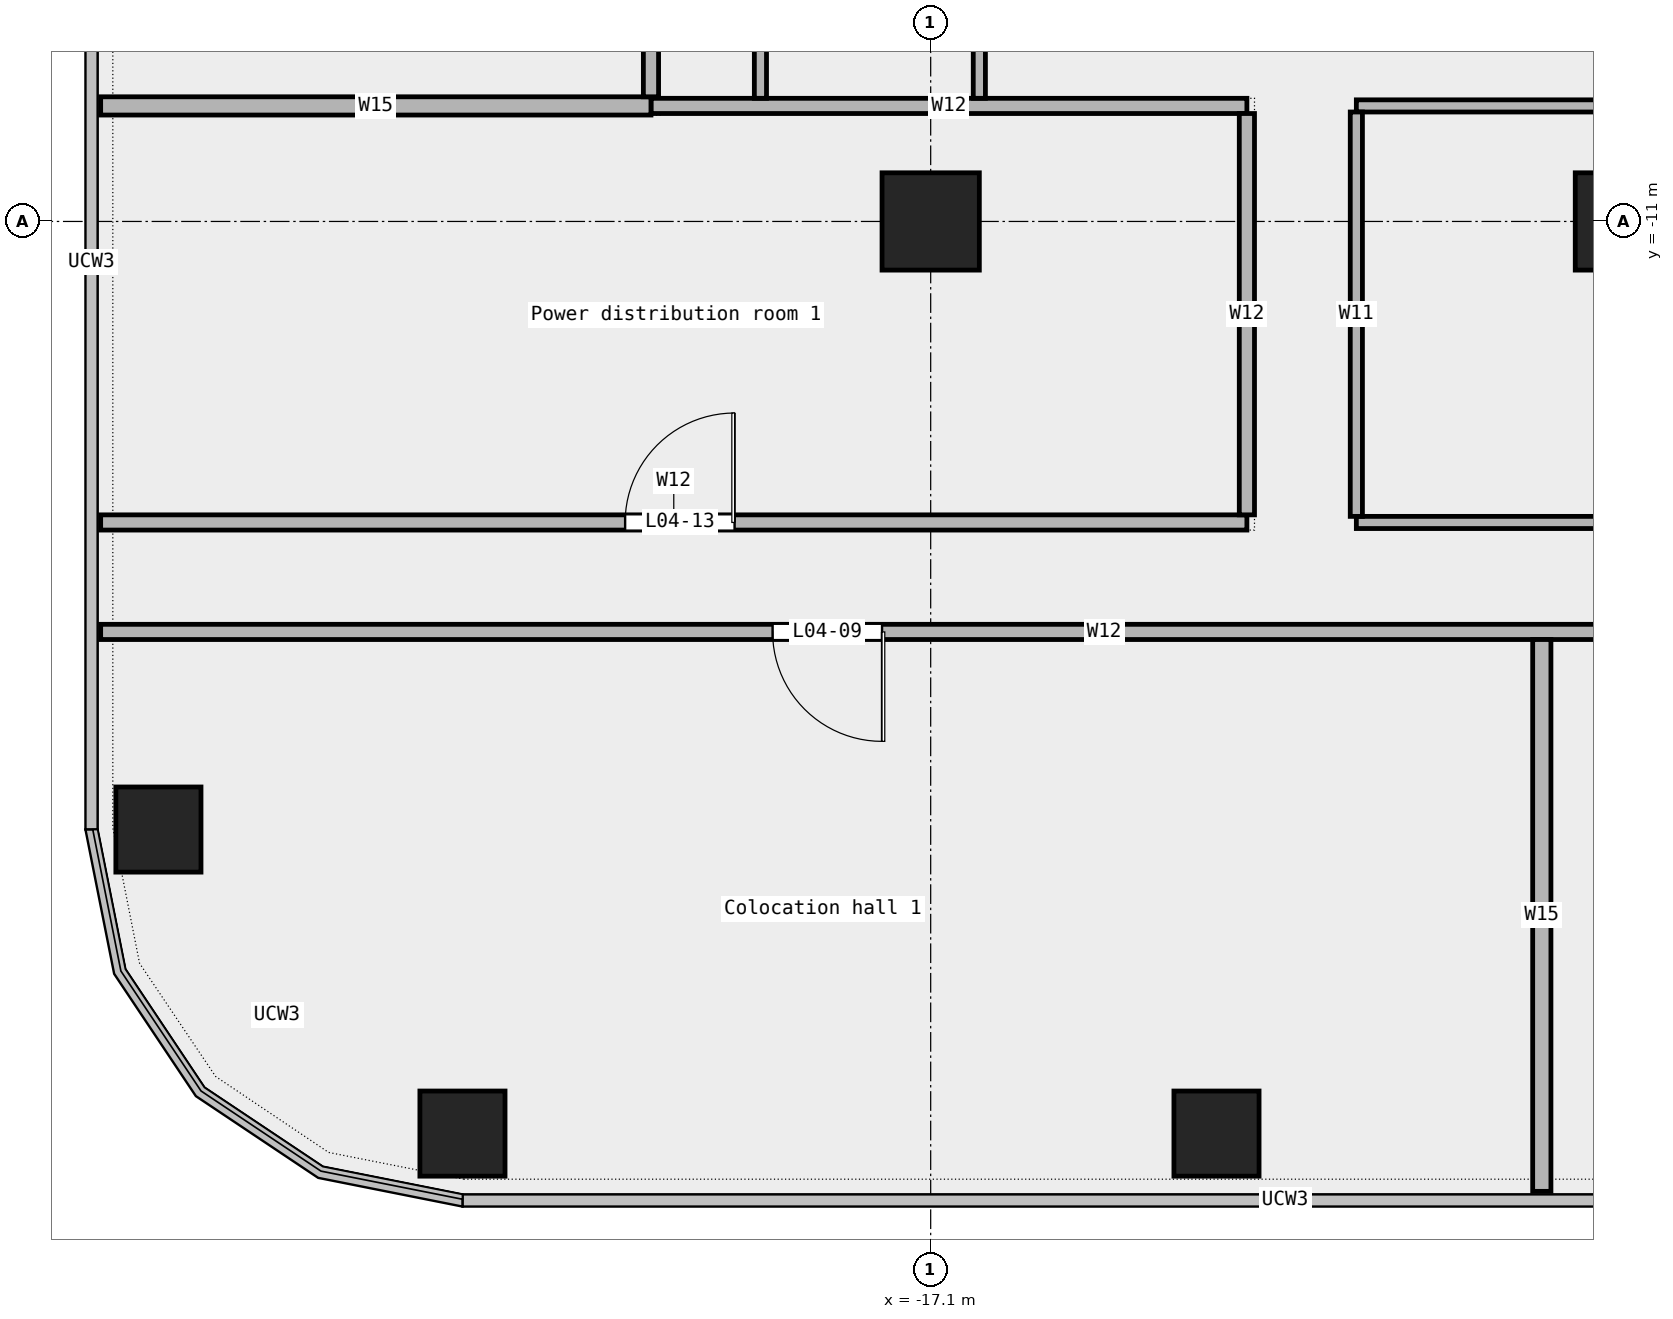
"""IFC4 building model, lengths in metres.
Left out: names, types, materials, properties, quantities, classifications, styles, units other than length and angle.
Written with IfcOpenShell. Run it as: python <this file> out.ifc"""

import sys

from ifc_helpers import new_model, si_unit, direction, frame, frame_2d, origin, origin_2d, place, context, subcontext, project, spatial, rectangle, extrude, element, fill, save


model = new_model("IFC4")
c1 = context("Model", 3, precision=1e-05, world=origin(), true_north=direction((0.0, 1.0)))
c2 = subcontext(c1, "Body", "Model", "MODEL_VIEW")
j1 = project(units=[si_unit("LENGTHUNIT", "METRE"), si_unit("PLANEANGLEUNIT", "RADIAN")], contexts=[c1])
p1 = place(None, origin())
s1 = spatial("IfcSite", under=j1, at=p1, CompositionType="ELEMENT")
p2 = place(p1, origin())
s2 = spatial("IfcBuilding", under=s1, at=p2, CompositionType="ELEMENT")
p3 = place(p2, frame((0.0, 0.0, 25.5)))
s3 = spatial("IfcBuildingStorey", under=s2, at=p3, CompositionType="ELEMENT", Elevation=25.5)
for number, where, z_axis, x_axis in (
    (1, (-24.8, -26.0, 0.0), (0.0, 0.0, 1.0), (1.0, 0.0, 0.0)),
    (2, (-12.4, -26.0, 0.0), (0.0, 0.0, 1.0), (1.0, 0.0, 0.0)),
    (3, (-29.8, -21.0, 0.0), (0.0, 0.0, 1.0), (1.0, 0.0, 0.0)),
):
    element("IfcColumn", number, at=place(p3, frame(where, z_axis=z_axis, x_axis=x_axis)), inside=s3, PredefinedType="COLUMN", context=c2, shape_type="SweptSolid", body=[
        extrude(rectangle(XDim=1.4, YDim=1.4, at=origin_2d()), origin(), (0.0, 0.0, 1.0), 5.05),
    ])
for number, where, z_axis, x_axis in (
    (4, (-17.1, -11.0, 0.0), (0.0, 0.0, 1.0), (1.0, 0.0, 0.0)),
    (5, (-5.7, -11.0, 0.0), (0.0, 0.0, 1.0), (1.0, 0.0, 0.0)),
):
    element("IfcColumn", number, at=place(p3, frame(where, z_axis=z_axis, x_axis=x_axis)), inside=s3, PredefinedType="COLUMN", context=c2, shape_type="SweptSolid", body=[
        extrude(rectangle(XDim=1.6, YDim=1.6, at=origin_2d()), origin(), (0.0, 0.0, 1.0), 5.05),
    ])
p4 = place(p3, frame((-30.75, -17.75, 0.0), z_axis=(0.0, 0.0, 1.0), x_axis=(1.0, 0.0, 0.0)))
e6 = element("IfcWall", 6, at=p4, inside=s3, PredefinedType="PARTITIONING", context=c2, shape_type="SweptSolid", body=[
    extrude(rectangle(XDim=33.005, YDim=0.25, at=frame_2d((16.502, 0.0))), origin(), (0.0, 0.0, 1.0), 5.05),
])
p5 = place(p4, frame((27.752, 0.0, 0.0)))
e7 = element("IfcOpeningElement", 7, at=p5, cuts=e6, PredefinedType="OPENING", context=c2, shape_type="SweptSolid", body=[
    extrude(rectangle(XDim=1.2, YDim=2.1, at=frame_2d((0.6, 1.05))), frame((0.0, 0.137, 0.0), z_axis=(0.0, -1.0, 0.0), x_axis=(1.0, 0.0, 0.0)), (0.0, 0.0, 1.0), 0.274),
])
p6 = place(p4, frame((11.05, 0.0, 0.0)))
e8 = element("IfcOpeningElement", 8, at=p6, cuts=e6, PredefinedType="OPENING", context=c2, shape_type="SweptSolid", body=[
    extrude(rectangle(XDim=1.8, YDim=2.1, at=frame_2d((0.9, 1.05))), frame((0.0, 0.137, 0.0), z_axis=(0.0, -1.0, 0.0), x_axis=(1.0, 0.0, 0.0)), (0.0, 0.0, 1.0), 0.274),
])
p7 = place(p3, frame((-10.1, -15.95, 0.0), z_axis=(0.0, 0.0, 1.0), x_axis=(1.0, 0.0, 0.0)))
e9 = element("IfcWall", 9, at=p7, inside=s3, PredefinedType="PARTITIONING", context=c2, shape_type="SweptSolid", body=[
    extrude(rectangle(XDim=20.81, YDim=0.2, at=frame_2d((10.405, 0.0))), origin(), (0.0, 0.0, 1.0), 5.05),
])
p8 = place(p3, frame((-30.75, -15.95, 0.0), z_axis=(0.0, 0.0, 1.0), x_axis=(1.0, 0.0, 0.0)))
e10 = element("IfcWall", 10, at=p8, inside=s3, PredefinedType="PARTITIONING", context=c2, shape_type="SweptSolid", body=[
    extrude(rectangle(XDim=18.85, YDim=0.25, at=frame_2d((9.425, 0.0))), origin(), (0.0, 0.0, 1.0), 5.05),
])
p9 = place(p8, frame((8.625, 0.0, 0.0)))
e11 = element("IfcOpeningElement", 11, at=p9, cuts=e10, PredefinedType="OPENING", context=c2, shape_type="SweptSolid", body=[
    extrude(rectangle(XDim=1.8, YDim=2.1, at=frame_2d((0.9, 1.05))), frame((0.0, 0.137, 0.0), z_axis=(0.0, -1.0, 0.0), x_axis=(1.0, 0.0, 0.0)), (0.0, 0.0, 1.0), 0.274),
])
p10 = place(p3, frame((-10.1, -9.1, 0.0), z_axis=(0.0, 0.0, 1.0), x_axis=(1.0, 0.0, 0.0)))
e12 = element("IfcWall", 12, at=p10, inside=s3, PredefinedType="PARTITIONING", context=c2, shape_type="SweptSolid", body=[
    extrude(rectangle(XDim=20.81, YDim=0.2, at=frame_2d((10.405, 0.0))), origin(), (0.0, 0.0, 1.0), 5.05),
])
p11 = place(p10, frame((16.742, 0.0, 0.0)))
e13 = element("IfcOpeningElement", 13, at=p11, cuts=e12, PredefinedType="OPENING", context=c2, shape_type="SweptSolid", body=[
    extrude(rectangle(XDim=1.2, YDim=2.1, at=frame_2d((0.6, 1.05))), frame((0.0, 0.112, 0.0), z_axis=(0.0, -1.0, 0.0), x_axis=(1.0, 0.0, 0.0)), (0.0, 0.0, 1.0), 0.224),
])
p12 = place(p10, frame((6.188, 0.0, 0.0)))
e14 = element("IfcOpeningElement", 14, at=p12, cuts=e12, PredefinedType="OPENING", context=c2, shape_type="SweptSolid", body=[
    extrude(rectangle(XDim=1.5, YDim=2.1, at=frame_2d((0.75, 1.05))), frame((0.0, 0.112, 0.0), z_axis=(0.0, -1.0, 0.0), x_axis=(1.0, 0.0, 0.0)), (0.0, 0.0, 1.0), 0.224),
])
p13 = place(p3, frame((-21.7, -9.1, 0.0), z_axis=(0.0, 0.0, 1.0), x_axis=(1.0, 0.0, 0.0)))
e15 = element("IfcWall", 15, at=p13, inside=s3, PredefinedType="PARTITIONING", context=c2, shape_type="SweptSolid", body=[
    extrude(rectangle(XDim=9.8, YDim=0.25, at=frame_2d((4.9, 0.0))), origin(), (0.0, 0.0, 1.0), 5.05),
])
p14 = place(p3, frame((-30.75, -9.1, 0.0), z_axis=(0.0, 0.0, 1.0), x_axis=(1.0, 0.0, 0.0)))
e16 = element("IfcWall", 16, at=p14, inside=s3, PredefinedType="PARTITIONING", context=c2, shape_type="SweptSolid", body=[
    extrude(rectangle(XDim=9.05, YDim=0.3, at=frame_2d((4.525, 0.0))), origin(), (0.0, 0.0, 1.0), 5.05),
])
p15 = place(p3, frame((-21.7, -8.95, 0.0), z_axis=(0.0, 0.0, 1.0), x_axis=(0.0, 1.0, 0.0)))
e17 = element("IfcWall", 17, at=p15, inside=s3, PredefinedType="PARTITIONING", context=c2, shape_type="SweptSolid", body=[
    extrude(rectangle(XDim=6.49, YDim=0.25, at=frame_2d((3.245, 0.0))), origin(), (0.0, 0.0, 1.0), 5.05),
])
p16 = place(p15, frame((2.645, 0.0, 0.0)))
e18 = element("IfcOpeningElement", 18, at=p16, cuts=e17, PredefinedType="OPENING", context=c2, shape_type="SweptSolid", body=[
    extrude(rectangle(XDim=1.2, YDim=2.1, at=frame_2d((0.6, 1.05))), frame((0.0, 0.137, 0.0), z_axis=(0.0, -1.0, 0.0), x_axis=(1.0, 0.0, 0.0)), (0.0, 0.0, 1.0), 0.274),
])
p17 = place(p3, frame((-19.9, -8.975, 0.0), z_axis=(0.0, 0.0, 1.0), x_axis=(0.0, 1.0, 0.0)))
e19 = element("IfcWall", 19, at=p17, inside=s3, PredefinedType="PARTITIONING", context=c2, shape_type="SweptSolid", body=[
    extrude(rectangle(XDim=5.425, YDim=0.2, at=frame_2d((2.712, 0.0))), origin(), (0.0, 0.0, 1.0), 5.05),
])
p18 = place(p3, frame((-16.3, -8.975, 0.0), z_axis=(0.0, 0.0, 1.0), x_axis=(0.0, 1.0, 0.0)))
e20 = element("IfcWall", 20, at=p18, inside=s3, PredefinedType="PARTITIONING", context=c2, shape_type="SweptSolid", body=[
    extrude(rectangle(XDim=5.425, YDim=0.2, at=frame_2d((2.712, 0.0))), origin(), (0.0, 0.0, 1.0), 5.05),
])
p19 = place(p18, frame((2.262, 0.0, 0.0)))
e21 = element("IfcOpeningElement", 21, at=p19, cuts=e20, PredefinedType="OPENING", context=c2, shape_type="SweptSolid", body=[
    extrude(rectangle(XDim=0.9, YDim=2.1, at=frame_2d((0.45, 1.05))), frame((0.0, 0.112, 0.0), z_axis=(0.0, -1.0, 0.0), x_axis=(1.0, 0.0, 0.0)), (0.0, 0.0, 1.0), 0.224),
])
p20 = place(p3, frame((-11.9, -15.825, 0.0), z_axis=(0.0, 0.0, 1.0), x_axis=(0.0, 1.0, 0.0)))
e22 = element("IfcWall", 22, at=p20, inside=s3, PredefinedType="PARTITIONING", context=c2, shape_type="SweptSolid", body=[
    extrude(rectangle(XDim=6.6, YDim=0.25, at=frame_2d((3.3, 0.0))), origin(), (0.0, 0.0, 1.0), 5.05),
])
p21 = place(p3, frame((-10.1, -15.85, 0.0), z_axis=(0.0, 0.0, 1.0), x_axis=(0.0, 1.0, 0.0)))
e23 = element("IfcWall", 23, at=p21, inside=s3, PredefinedType="PARTITIONING", context=c2, shape_type="SweptSolid", body=[
    extrude(rectangle(XDim=6.65, YDim=0.2, at=frame_2d((3.325, 0.0))), origin(), (0.0, 0.0, 1.0), 5.05),
])
p22 = place(p3, frame((-7.05, -26.95, 0.0), z_axis=(0.0, 0.0, 1.0), x_axis=(0.0, 1.0, 0.0)))
e24 = element("IfcWall", 24, at=p22, inside=s3, PredefinedType="PARTITIONING", context=c2, shape_type="SweptSolid", body=[
    extrude(rectangle(XDim=9.075, YDim=0.3, at=frame_2d((4.538, 0.0))), origin(), (0.0, 0.0, 1.0), 5.05),
])
p23 = place(p6, origin())
e25 = element("IfcDoor", 25, at=p23, inside=s3, OperationType="DOUBLE_DOOR_SINGLE_SWING", PredefinedType="DOOR", context=c2, shape_type="SweptSolid", body=[
    extrude(rectangle(XDim=1.8, YDim=2.1, at=frame_2d((0.9, 1.05))), frame((0.0, 0.025, 0.0), z_axis=(0.0, -1.0, 0.0), x_axis=(1.0, 0.0, 0.0)), (0.0, 0.0, 1.0), 0.05),
])
fill(e8, e25)
p24 = place(p9, origin())
e26 = element("IfcDoor", 26, at=p24, inside=s3, OperationType="DOUBLE_DOOR_SINGLE_SWING", PredefinedType="DOOR", context=c2, shape_type="SweptSolid", body=[
    extrude(rectangle(XDim=1.8, YDim=2.1, at=frame_2d((0.9, 1.05))), frame((0.0, 0.025, 0.0), z_axis=(0.0, -1.0, 0.0), x_axis=(1.0, 0.0, 0.0)), (0.0, 0.0, 1.0), 0.05),
])
fill(e11, e26)
save(model, sys.argv[1])
